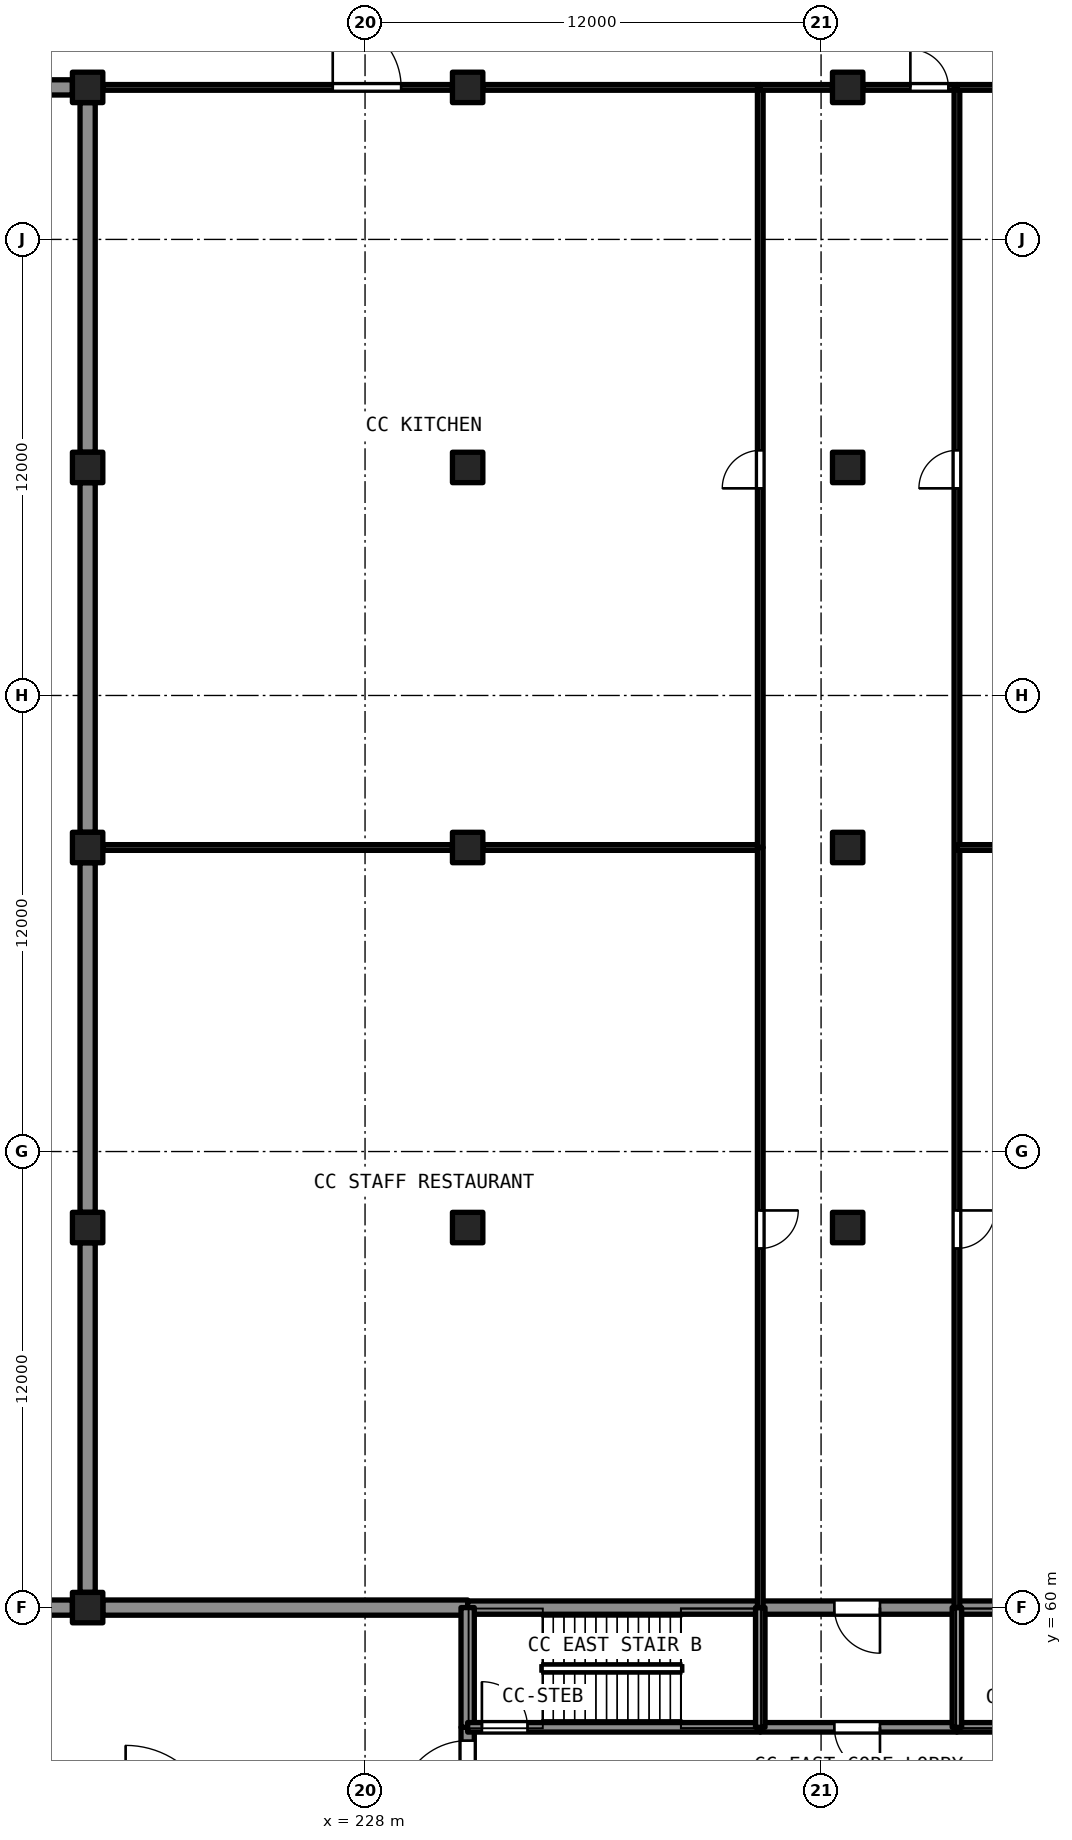
"""IFC4 building model, lengths in metres.
Left out: names, types, materials, properties, quantities, classifications, styles, units other than length and angle.
Written with IfcOpenShell. Run it as: python <this file> out.ifc"""

import sys

from ifc_helpers import new_model, si_unit, direction, frame, frame_2d, origin, origin_2d, place, context, subcontext, project, spatial, rectangle, extrude, element, fill, save


model = new_model("IFC4")
c1 = context("Model", 3, precision=1e-05, world=origin(), true_north=direction((0.0, 1.0)))
c2 = subcontext(c1, "Body", "Model", "MODEL_VIEW")
j1 = project(units=[si_unit("LENGTHUNIT", "METRE"), si_unit("PLANEANGLEUNIT", "RADIAN")], contexts=[c1])
p1 = place(None, origin())
s1 = spatial("IfcSite", under=j1, at=p1, CompositionType="ELEMENT")
p2 = place(p1, origin())
s2 = spatial("IfcBuilding", under=s1, at=p2, CompositionType="ELEMENT")
p3 = place(p2, origin())
s3 = spatial("IfcBuildingStorey", under=s2, at=p3, CompositionType="ELEMENT", Elevation=0.0)
for number, where, z_axis, x_axis in (
    (1, (220.7, 60.0, -1.2), (0.0, 0.0, 1.0), (1.0, 0.0, 0.0)),
    (2, (220.7, 70.0, -1.2), (0.0, 0.0, 1.0), (1.0, 0.0, 0.0)),
    (3, (220.7, 80.0, -1.2), (0.0, 0.0, 1.0), (1.0, 0.0, 0.0)),
    (4, (220.7, 90.0, -1.2), (0.0, 0.0, 1.0), (1.0, 0.0, 0.0)),
    (5, (220.7, 100.0, -1.2), (0.0, 0.0, 1.0), (1.0, 0.0, 0.0)),
    (6, (230.7, 70.0, -1.2), (0.0, 0.0, 1.0), (1.0, 0.0, 0.0)),
    (7, (230.7, 80.0, -1.2), (0.0, 0.0, 1.0), (1.0, 0.0, 0.0)),
    (8, (230.7, 90.0, -1.2), (0.0, 0.0, 1.0), (1.0, 0.0, 0.0)),
):
    element("IfcColumn", number, at=place(p3, frame(where, z_axis=z_axis, x_axis=x_axis)), inside=s3, PredefinedType="COLUMN", context=c2, shape_type="SweptSolid", body=[
        extrude(rectangle(XDim=0.8, YDim=0.8, at=origin_2d()), origin(), (0.0, 0.0, 1.0), 10.2),
    ])
p4 = place(p3, frame((230.7, 100.0, -1.2), z_axis=(0.0, 0.0, 1.0), x_axis=(1.0, 0.0, 0.0)))
e9 = element("IfcColumn", 9, at=p4, inside=s3, PredefinedType="COLUMN", context=c2, shape_type="SweptSolid", body=[
    extrude(rectangle(XDim=0.8, YDim=0.8, at=origin_2d()), origin(), (0.0, 0.0, 1.0), 9.745),
])
for number, where, z_axis, x_axis in (
    (10, (240.7, 70.0, -1.2), (0.0, 0.0, 1.0), (1.0, 0.0, 0.0)),
    (11, (240.7, 80.0, -1.2), (0.0, 0.0, 1.0), (1.0, 0.0, 0.0)),
    (12, (240.7, 90.0, -1.2), (0.0, 0.0, 1.0), (1.0, 0.0, 0.0)),
):
    element("IfcColumn", number, at=place(p3, frame(where, z_axis=z_axis, x_axis=x_axis)), inside=s3, PredefinedType="COLUMN", context=c2, shape_type="SweptSolid", body=[
        extrude(rectangle(XDim=0.8, YDim=0.8, at=origin_2d()), origin(), (0.0, 0.0, 1.0), 10.2),
    ])
p5 = place(p3, frame((240.7, 100.0, -1.2), z_axis=(0.0, 0.0, 1.0), x_axis=(1.0, 0.0, 0.0)))
e13 = element("IfcColumn", 13, at=p5, inside=s3, PredefinedType="COLUMN", context=c2, shape_type="SweptSolid", body=[
    extrude(rectangle(XDim=0.8, YDim=0.8, at=origin_2d()), origin(), (0.0, 0.0, 1.0), 9.745),
])
p6 = place(p3, frame((211.1, 60.0, 0.0), z_axis=(0.0, 0.0, 1.0), x_axis=(1.0, 0.0, 0.0)))
e14 = element("IfcWall", 14, at=p6, inside=s3, PredefinedType="SHEAR", context=c2, shape_type="SweptSolid", body=[
    extrude(rectangle(XDim=9.2, YDim=0.4, at=frame_2d((4.6, 0.0))), origin(), (0.0, 0.0, 1.0), 9.0),
])
p7 = place(p3, frame((211.1, 100.0, 0.0), z_axis=(0.0, 0.0, 1.0), x_axis=(1.0, 0.0, 0.0)))
e15 = element("IfcWall", 15, at=p7, inside=s3, PredefinedType="SHEAR", context=c2, shape_type="SweptSolid", body=[
    extrude(rectangle(XDim=9.2, YDim=0.4, at=frame_2d((4.6, 0.0))), origin(), (0.0, 0.0, 1.0), 9.0),
])
p8 = place(p7, frame((2.8, 0.0, 0.0)))
e16 = element("IfcOpeningElement", 16, at=p8, cuts=e15, PredefinedType="OPENING", context=c2, shape_type="SweptSolid", body=[
    extrude(rectangle(XDim=2.4, YDim=2.4, at=frame_2d((1.2, 1.2))), frame((0.0, 0.21, 0.0), z_axis=(0.0, -1.0, 0.0), x_axis=(1.0, 0.0, 0.0)), (0.0, 0.0, 1.0), 0.421),
])
for number, where, z_axis, x_axis in (
    (17, (220.7, 60.4, 0.0), (0.0, 0.0, 1.0), (0.0, 1.0, 0.0)),
    (18, (220.7, 70.4, 0.0), (0.0, 0.0, 1.0), (0.0, 1.0, 0.0)),
    (19, (220.7, 80.4, 0.0), (0.0, 0.0, 1.0), (0.0, 1.0, 0.0)),
    (20, (220.7, 90.4, 0.0), (0.0, 0.0, 1.0), (0.0, 1.0, 0.0)),
):
    element("IfcWall", number, at=place(p3, frame(where, z_axis=z_axis, x_axis=x_axis)), inside=s3, PredefinedType="SHEAR", context=c2, shape_type="SweptSolid", body=[
        extrude(rectangle(XDim=9.2, YDim=0.4, at=frame_2d((4.6, 0.0))), origin(), (0.0, 0.0, 1.0), 9.0),
    ])
p9 = place(p3, frame((221.1, 60.0, 0.0), z_axis=(0.0, 0.0, 1.0), x_axis=(1.0, 0.0, 0.0)))
e21 = element("IfcWall", 21, at=p9, inside=s3, PredefinedType="SHEAR", context=c2, shape_type="SweptSolid", body=[
    extrude(rectangle(XDim=9.6, YDim=0.4, at=frame_2d((4.8, 0.0))), origin(), (0.0, 0.0, 1.0), 9.0),
])
p10 = place(p3, frame((230.7, 60.0, 0.0), z_axis=(0.0, 0.0, 1.0), x_axis=(1.0, 0.0, 0.0)))
e22 = element("IfcWall", 22, at=p10, inside=s3, PredefinedType="SHEAR", context=c2, shape_type="SweptSolid", body=[
    extrude(rectangle(XDim=7.7, YDim=0.35, at=frame_2d((3.85, 0.0))), origin(), (0.0, 0.0, 1.0), 8.59),
])
p11 = place(p3, frame((238.4, 60.0, 0.0), z_axis=(0.0, 0.0, 1.0), x_axis=(1.0, 0.0, 0.0)))
e23 = element("IfcWall", 23, at=p11, inside=s3, PredefinedType="SHEAR", context=c2, shape_type="SweptSolid", body=[
    extrude(rectangle(XDim=5.175, YDim=0.35, at=frame_2d((2.587, 0.0))), origin(), (0.0, 0.0, 1.0), 8.59),
])
p12 = place(p11, frame((1.95, 0.0, 0.0)))
e24 = element("IfcOpeningElement", 24, at=p12, cuts=e23, PredefinedType="OPENING", context=c2, shape_type="SweptSolid", body=[
    extrude(rectangle(XDim=1.2, YDim=2.1, at=frame_2d((0.6, 1.05))), frame((0.0, 0.186, 0.0), z_axis=(0.0, -1.0, 0.0), x_axis=(1.0, 0.0, 0.0)), (0.0, 0.0, 1.0), 0.371),
])
p13 = place(p3, frame((243.575, 60.0, 0.0), z_axis=(0.0, 0.0, 1.0), x_axis=(1.0, 0.0, 0.0)))
e25 = element("IfcWall", 25, at=p13, inside=s3, PredefinedType="SHEAR", context=c2, shape_type="SweptSolid", body=[
    extrude(rectangle(XDim=7.525, YDim=0.35, at=frame_2d((3.763, 0.0))), origin(), (0.0, 0.0, 1.0), 8.59),
])
p14 = place(p3, frame((230.7, 53.975, 0.0), z_axis=(0.0, 0.0, 1.0), x_axis=(0.0, 1.0, 0.0)))
e26 = element("IfcWall", 26, at=p14, inside=s3, PredefinedType="SHEAR", context=c2, shape_type="SweptSolid", body=[
    extrude(rectangle(XDim=2.875, YDim=0.35, at=frame_2d((1.438, 0.0))), origin(), (0.0, 0.0, 1.0), 8.59),
])
p15 = place(p14, frame((0.725, 0.0, 0.0)))
e27 = element("IfcOpeningElement", 27, at=p15, cuts=e26, PredefinedType="OPENING", context=c2, shape_type="SweptSolid", body=[
    extrude(rectangle(XDim=1.8, YDim=2.1, at=frame_2d((0.9, 1.05))), frame((0.0, 0.186, 0.0), z_axis=(0.0, -1.0, 0.0), x_axis=(1.0, 0.0, 0.0)), (0.0, 0.0, 1.0), 0.371),
])
p16 = place(p3, frame((230.7, 56.85, 0.0), z_axis=(0.0, 0.0, 1.0), x_axis=(0.0, 1.0, 0.0)))
e28 = element("IfcWall", 28, at=p16, inside=s3, PredefinedType="SHEAR", context=c2, shape_type="SweptSolid", body=[
    extrude(rectangle(XDim=3.15, YDim=0.35, at=frame_2d((1.575, 0.0))), origin(), (0.0, 0.0, 1.0), 8.59),
])
p17 = place(p3, frame((238.4, 56.85, 0.0), z_axis=(0.0, 0.0, 1.0), x_axis=(-1.0, 0.0, 0.0)))
e29 = element("IfcWall", 29, at=p17, inside=s3, PredefinedType="SHEAR", context=c2, shape_type="SweptSolid", body=[
    extrude(rectangle(XDim=7.7, YDim=0.25, at=frame_2d((3.85, 0.0))), origin(), (0.0, 0.0, 1.0), 8.59),
])
p18 = place(p17, frame((6.125, 0.0, 0.0)))
e30 = element("IfcOpeningElement", 30, at=p18, cuts=e29, PredefinedType="OPENING", context=c2, shape_type="SweptSolid", body=[
    extrude(rectangle(XDim=1.2, YDim=2.1, at=frame_2d((0.6, 1.05))), frame((0.0, 0.135, 0.0), z_axis=(0.0, -1.0, 0.0), x_axis=(1.0, 0.0, 0.0)), (0.0, 0.0, 1.0), 0.271),
])
p19 = place(p3, frame((243.575, 56.85, 0.0), z_axis=(0.0, 0.0, 1.0), x_axis=(-1.0, 0.0, 0.0)))
e31 = element("IfcWall", 31, at=p19, inside=s3, PredefinedType="SHEAR", context=c2, shape_type="SweptSolid", body=[
    extrude(rectangle(XDim=5.175, YDim=0.25, at=frame_2d((2.587, 0.0))), origin(), (0.0, 0.0, 1.0), 8.59),
])
p20 = place(p19, frame((2.025, 0.0, 0.0)))
e32 = element("IfcOpeningElement", 32, at=p20, cuts=e31, PredefinedType="OPENING", context=c2, shape_type="SweptSolid", body=[
    extrude(rectangle(XDim=1.2, YDim=2.1, at=frame_2d((0.6, 1.05))), frame((0.0, 0.135, 0.0), z_axis=(0.0, -1.0, 0.0), x_axis=(1.0, 0.0, 0.0)), (0.0, 0.0, 1.0), 0.271),
])
p21 = place(p3, frame((251.1, 56.85, 0.0), z_axis=(0.0, 0.0, 1.0), x_axis=(-1.0, 0.0, 0.0)))
e33 = element("IfcWall", 33, at=p21, inside=s3, PredefinedType="SHEAR", context=c2, shape_type="SweptSolid", body=[
    extrude(rectangle(XDim=7.525, YDim=0.25, at=frame_2d((3.763, 0.0))), origin(), (0.0, 0.0, 1.0), 8.59),
])
p22 = place(p21, frame((0.4, 0.0, 0.0)))
e34 = element("IfcOpeningElement", 34, at=p22, cuts=e33, PredefinedType="OPENING", context=c2, shape_type="SweptSolid", body=[
    extrude(rectangle(XDim=1.2, YDim=2.1, at=frame_2d((0.6, 1.05))), frame((0.0, 0.135, 0.0), z_axis=(0.0, -1.0, 0.0), x_axis=(1.0, 0.0, 0.0)), (0.0, 0.0, 1.0), 0.271),
])
for number, where, z_axis, x_axis in (
    (35, (243.575, 56.85, 0.0), (0.0, 0.0, 1.0), (0.0, 1.0, 0.0)),
    (36, (238.4, 56.85, 0.0), (0.0, 0.0, 1.0), (0.0, 1.0, 0.0)),
):
    element("IfcWall", number, at=place(p3, frame(where, z_axis=z_axis, x_axis=x_axis)), inside=s3, PredefinedType="SHEAR", context=c2, shape_type="SweptSolid", body=[
        extrude(rectangle(XDim=3.15, YDim=0.25, at=frame_2d((1.575, 0.0))), origin(), (0.0, 0.0, 1.0), 8.59),
    ])
p23 = place(p3, frame((221.1, 80.0, 0.0), z_axis=(0.0, 0.0, 1.0), x_axis=(1.0, 0.0, 0.0)))
e37 = element("IfcWall", 37, at=p23, inside=s3, PredefinedType="PARTITIONING", context=c2, shape_type="SweptSolid", body=[
    extrude(rectangle(XDim=9.2, YDim=0.15, at=frame_2d((4.6, 0.0))), origin(), (0.0, 0.0, 1.0), 8.54),
])
p24 = place(p3, frame((231.1, 80.0, 0.0), z_axis=(0.0, 0.0, 1.0), x_axis=(1.0, 0.0, 0.0)))
e38 = element("IfcWall", 38, at=p24, inside=s3, PredefinedType="PARTITIONING", context=c2, shape_type="SweptSolid", body=[
    extrude(rectangle(XDim=7.3, YDim=0.15, at=frame_2d((3.65, 0.0))), origin(), (0.0, 0.0, 1.0), 8.54),
])
p25 = place(p3, frame((221.1, 100.0, 0.0), z_axis=(0.0, 0.0, 1.0), x_axis=(1.0, 0.0, 0.0)))
e39 = element("IfcWall", 39, at=p25, inside=s3, PredefinedType="PARTITIONING", context=c2, shape_type="SweptSolid", body=[
    extrude(rectangle(XDim=9.2, YDim=0.15, at=frame_2d((4.6, 0.0))), origin(), (0.0, 0.0, 1.0), 8.54),
])
p26 = place(p25, frame((6.05, 0.0, 0.0)))
e40 = element("IfcOpeningElement", 40, at=p26, cuts=e39, PredefinedType="OPENING", context=c2, shape_type="SweptSolid", body=[
    extrude(rectangle(XDim=1.8, YDim=2.1, at=frame_2d((0.9, 1.05))), frame((0.0, 0.085, 0.0), z_axis=(0.0, -1.0, 0.0), x_axis=(1.0, 0.0, 0.0)), (0.0, 0.0, 1.0), 0.171),
])
p27 = place(p3, frame((231.1, 100.0, 0.0), z_axis=(0.0, 0.0, 1.0), x_axis=(1.0, 0.0, 0.0)))
e41 = element("IfcWall", 41, at=p27, inside=s3, PredefinedType="PARTITIONING", context=c2, shape_type="SweptSolid", body=[
    extrude(rectangle(XDim=7.3, YDim=0.15, at=frame_2d((3.65, 0.0))), origin(), (0.0, 0.0, 1.0), 8.54),
])
p28 = place(p3, frame((238.4, 100.0, 0.0), z_axis=(0.0, 0.0, 1.0), x_axis=(0.0, -1.0, 0.0)))
e42 = element("IfcWall", 42, at=p28, inside=s3, PredefinedType="PARTITIONING", context=c2, shape_type="SweptSolid", body=[
    extrude(rectangle(XDim=20.0, YDim=0.15, at=frame_2d((10.0, 0.0))), origin(), (0.0, 0.0, 1.0), 8.54),
])
p29 = place(p28, frame((9.55, 0.0, 0.0)))
e43 = element("IfcOpeningElement", 43, at=p29, cuts=e42, PredefinedType="OPENING", context=c2, shape_type="SweptSolid", body=[
    extrude(rectangle(XDim=1.0, YDim=2.1, at=frame_2d((0.5, 1.05))), frame((0.0, 0.085, 0.0), z_axis=(0.0, -1.0, 0.0), x_axis=(1.0, 0.0, 0.0)), (0.0, 0.0, 1.0), 0.171),
])
p30 = place(p3, frame((238.4, 80.0, 0.0), z_axis=(0.0, 0.0, 1.0), x_axis=(0.0, -1.0, 0.0)))
e44 = element("IfcWall", 44, at=p30, inside=s3, PredefinedType="PARTITIONING", context=c2, shape_type="SweptSolid", body=[
    extrude(rectangle(XDim=20.0, YDim=0.15, at=frame_2d((10.0, 0.0))), origin(), (0.0, 0.0, 1.0), 8.54),
])
p31 = place(p30, frame((9.55, 0.0, 0.0)))
e45 = element("IfcOpeningElement", 45, at=p31, cuts=e44, PredefinedType="OPENING", context=c2, shape_type="SweptSolid", body=[
    extrude(rectangle(XDim=1.0, YDim=2.1, at=frame_2d((0.5, 1.05))), frame((0.0, 0.085, 0.0), z_axis=(0.0, -1.0, 0.0), x_axis=(1.0, 0.0, 0.0)), (0.0, 0.0, 1.0), 0.171),
])
p32 = place(p3, frame((238.4, 100.0, 0.0), z_axis=(0.0, 0.0, 1.0), x_axis=(1.0, 0.0, 0.0)))
e46 = element("IfcWall", 46, at=p32, inside=s3, PredefinedType="PARTITIONING", context=c2, shape_type="SweptSolid", body=[
    extrude(rectangle(XDim=1.9, YDim=0.15, at=frame_2d((0.95, 0.0))), origin(), (0.0, 0.0, 1.0), 8.54),
])
p33 = place(p3, frame((241.1, 100.0, 0.0), z_axis=(0.0, 0.0, 1.0), x_axis=(1.0, 0.0, 0.0)))
e47 = element("IfcWall", 47, at=p33, inside=s3, PredefinedType="PARTITIONING", context=c2, shape_type="SweptSolid", body=[
    extrude(rectangle(XDim=2.475, YDim=0.15, at=frame_2d((1.237, 0.0))), origin(), (0.0, 0.0, 1.0), 8.54),
])
p34 = place(p33, frame((1.25, 0.0, 0.0)))
e48 = element("IfcOpeningElement", 48, at=p34, cuts=e47, PredefinedType="OPENING", context=c2, shape_type="SweptSolid", body=[
    extrude(rectangle(XDim=1.0, YDim=2.1, at=frame_2d((0.5, 1.05))), frame((0.0, 0.085, 0.0), z_axis=(0.0, -1.0, 0.0), x_axis=(1.0, 0.0, 0.0)), (0.0, 0.0, 1.0), 0.171),
])
p35 = place(p3, frame((243.575, 60.0, 0.0), z_axis=(0.0, 0.0, 1.0), x_axis=(0.0, 1.0, 0.0)))
e49 = element("IfcWall", 49, at=p35, inside=s3, PredefinedType="PARTITIONING", context=c2, shape_type="SweptSolid", body=[
    extrude(rectangle(XDim=40.0, YDim=0.15, at=frame_2d((20.0, 0.0))), origin(), (0.0, 0.0, 1.0), 8.54),
])
p36 = place(p35, frame((9.45, 0.0, 0.0)))
e50 = element("IfcOpeningElement", 50, at=p36, cuts=e49, PredefinedType="OPENING", context=c2, shape_type="SweptSolid", body=[
    extrude(rectangle(XDim=1.0, YDim=2.1, at=frame_2d((0.5, 1.05))), frame((0.0, 0.085, 0.0), z_axis=(0.0, -1.0, 0.0), x_axis=(1.0, 0.0, 0.0)), (0.0, 0.0, 1.0), 0.171),
])
p37 = place(p35, frame((29.45, 0.0, 0.0)))
e51 = element("IfcOpeningElement", 51, at=p37, cuts=e49, PredefinedType="OPENING", context=c2, shape_type="SweptSolid", body=[
    extrude(rectangle(XDim=1.0, YDim=2.1, at=frame_2d((0.5, 1.05))), frame((0.0, 0.085, 0.0), z_axis=(0.0, -1.0, 0.0), x_axis=(1.0, 0.0, 0.0)), (0.0, 0.0, 1.0), 0.171),
])
for number, where, z_axis, x_axis in (
    (52, (243.575, 80.0, 0.0), (0.0, 0.0, 1.0), (1.0, 0.0, 0.0)),
    (53, (243.575, 100.0, 0.0), (0.0, 0.0, 1.0), (1.0, 0.0, 0.0)),
):
    element("IfcWall", number, at=place(p3, frame(where, z_axis=z_axis, x_axis=x_axis)), inside=s3, PredefinedType="PARTITIONING", context=c2, shape_type="SweptSolid", body=[
        extrude(rectangle(XDim=6.725, YDim=0.15, at=frame_2d((3.363, 0.0))), origin(), (0.0, 0.0, 1.0), 8.54),
    ])
p38 = place(p15, origin())
e54 = element("IfcDoor", 54, at=p38, inside=s3, OperationType="DOUBLE_DOOR_SINGLE_SWING", PredefinedType="DOOR", context=c2, shape_type="SweptSolid", body=[
    extrude(rectangle(XDim=1.8, YDim=2.1, at=frame_2d((0.9, 1.05))), frame((0.0, 0.025, 0.0), z_axis=(0.0, -1.0, 0.0), x_axis=(1.0, 0.0, 0.0)), (0.0, 0.0, 1.0), 0.05),
])
fill(e27, e54)
p39 = place(p26, origin())
e55 = element("IfcDoor", 55, at=p39, inside=s3, OperationType="DOUBLE_DOOR_SINGLE_SWING", PredefinedType="DOOR", context=c2, shape_type="SweptSolid", body=[
    extrude(rectangle(XDim=1.8, YDim=2.1, at=frame_2d((0.9, 1.05))), frame((0.0, 0.025, 0.0), z_axis=(0.0, -1.0, 0.0), x_axis=(1.0, 0.0, 0.0)), (0.0, 0.0, 1.0), 0.05),
])
fill(e40, e55)
p40 = place(p34, origin())
e56 = element("IfcDoor", 56, at=p40, inside=s3, OperationType="SINGLE_SWING_LEFT", PredefinedType="DOOR", context=c2, shape_type="SweptSolid", body=[
    extrude(rectangle(XDim=1.0, YDim=2.1, at=frame_2d((0.5, 1.05))), frame((0.0, 0.025, 0.0), z_axis=(0.0, -1.0, 0.0), x_axis=(1.0, 0.0, 0.0)), (0.0, 0.0, 1.0), 0.05),
])
fill(e48, e56)
p41 = place(p29, origin())
e57 = element("IfcDoor", 57, at=p41, inside=s3, OperationType="SINGLE_SWING_RIGHT", PredefinedType="DOOR", context=c2, shape_type="SweptSolid", body=[
    extrude(rectangle(XDim=1.0, YDim=2.1, at=frame_2d((0.5, 1.05))), frame((0.0, 0.025, 0.0), z_axis=(0.0, -1.0, 0.0), x_axis=(1.0, 0.0, 0.0)), (0.0, 0.0, 1.0), 0.05),
])
fill(e43, e57)
p42 = place(p31, origin())
e58 = element("IfcDoor", 58, at=p42, inside=s3, OperationType="SINGLE_SWING_LEFT", PredefinedType="DOOR", context=c2, shape_type="SweptSolid", body=[
    extrude(rectangle(XDim=1.0, YDim=2.1, at=frame_2d((0.5, 1.05))), frame((0.0, 0.025, 0.0), z_axis=(0.0, -1.0, 0.0), x_axis=(1.0, 0.0, 0.0)), (0.0, 0.0, 1.0), 0.05),
])
fill(e45, e58)
p43 = place(p36, origin())
e59 = element("IfcDoor", 59, at=p43, inside=s3, OperationType="SINGLE_SWING_RIGHT", PredefinedType="DOOR", context=c2, shape_type="SweptSolid", body=[
    extrude(rectangle(XDim=1.0, YDim=2.1, at=frame_2d((0.5, 1.05))), frame((0.0, 0.025, 0.0), z_axis=(0.0, -1.0, 0.0), x_axis=(1.0, 0.0, 0.0)), (0.0, 0.0, 1.0), 0.05),
])
fill(e50, e59)
p44 = place(p37, origin())
e60 = element("IfcDoor", 60, at=p44, inside=s3, OperationType="SINGLE_SWING_LEFT", PredefinedType="DOOR", context=c2, shape_type="SweptSolid", body=[
    extrude(rectangle(XDim=1.0, YDim=2.1, at=frame_2d((0.5, 1.05))), frame((0.0, 0.025, 0.0), z_axis=(0.0, -1.0, 0.0), x_axis=(1.0, 0.0, 0.0)), (0.0, 0.0, 1.0), 0.05),
])
fill(e51, e60)
p45 = place(p12, origin())
e61 = element("IfcDoor", 61, at=p45, inside=s3, OperationType="SINGLE_SWING_RIGHT", PredefinedType="DOOR", context=c2, shape_type="SweptSolid", body=[
    extrude(rectangle(XDim=1.2, YDim=2.1, at=frame_2d((0.6, 1.05))), frame((0.0, 0.025, 0.0), z_axis=(0.0, -1.0, 0.0), x_axis=(1.0, 0.0, 0.0)), (0.0, 0.0, 1.0), 0.05),
])
fill(e24, e61)
p46 = place(p18, origin())
e62 = element("IfcDoor", 62, at=p46, inside=s3, OperationType="SINGLE_SWING_RIGHT", PredefinedType="DOOR", context=c2, shape_type="SweptSolid", body=[
    extrude(rectangle(XDim=1.2, YDim=2.1, at=frame_2d((0.6, 1.05))), frame((0.0, 0.025, 0.0), z_axis=(0.0, -1.0, 0.0), x_axis=(1.0, 0.0, 0.0)), (0.0, 0.0, 1.0), 0.05),
])
fill(e30, e62)
p47 = place(p20, origin())
e63 = element("IfcDoor", 63, at=p47, inside=s3, OperationType="SINGLE_SWING_LEFT", PredefinedType="DOOR", context=c2, shape_type="SweptSolid", body=[
    extrude(rectangle(XDim=1.2, YDim=2.1, at=frame_2d((0.6, 1.05))), frame((0.0, 0.025, 0.0), z_axis=(0.0, -1.0, 0.0), x_axis=(1.0, 0.0, 0.0)), (0.0, 0.0, 1.0), 0.05),
])
fill(e32, e63)
save(model, sys.argv[1])
